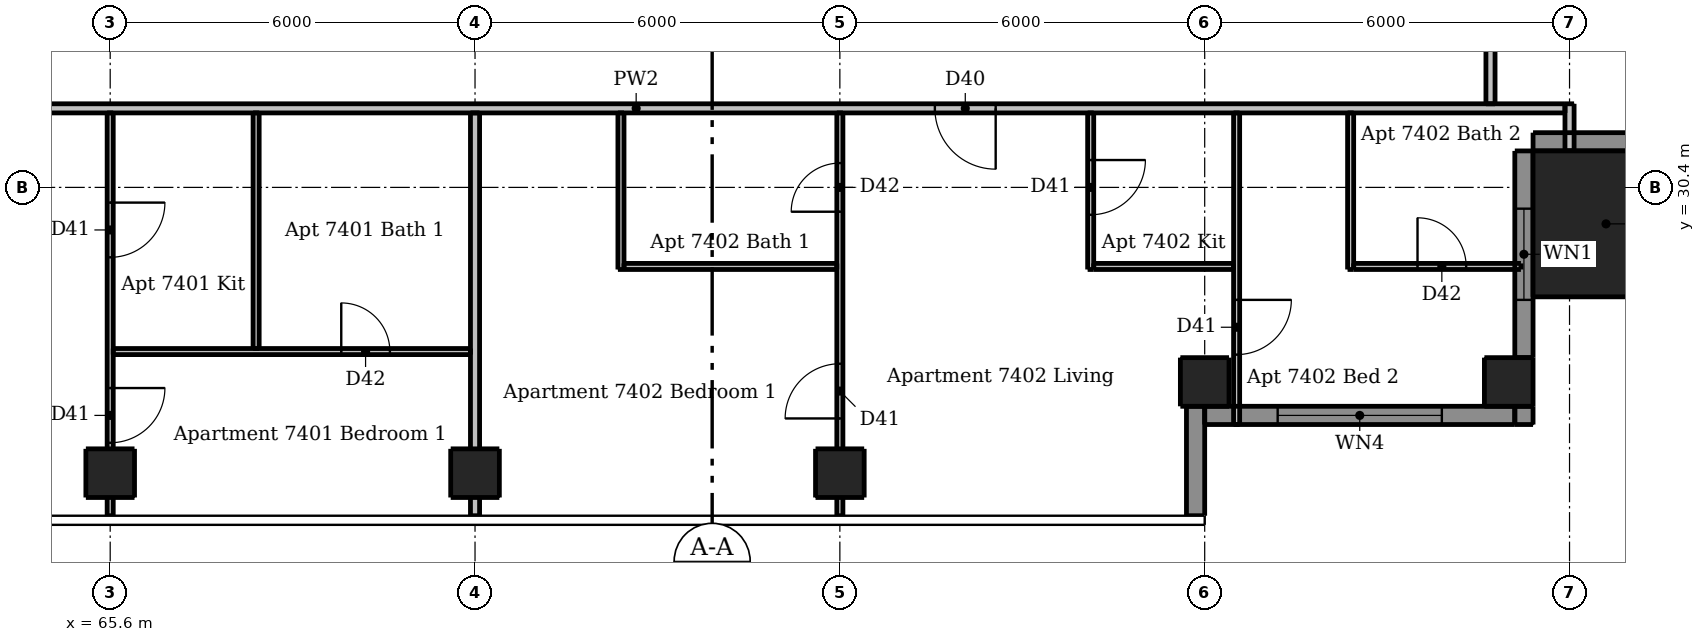
"""IFC4 building model, lengths in metres.
Left out: names, types, materials, properties, quantities, classifications, styles, units other than length and angle.
Written with IfcOpenShell. Run it as: python <this file> out.ifc"""

import sys

from ifc_helpers import new_model, si_unit, direction, frame, frame_2d, origin, origin_2d, place, context, subcontext, project, spatial, rectangle, extrude, element, fill, save


model = new_model("IFC4")
c1 = context("Model", 3, precision=1e-05, world=origin(), true_north=direction((0.0, 1.0)))
c2 = subcontext(c1, "Body", "Model", "MODEL_VIEW")
j1 = project(units=[si_unit("LENGTHUNIT", "METRE"), si_unit("PLANEANGLEUNIT", "RADIAN")], contexts=[c1])
p1 = place(None, origin())
s1 = spatial("IfcSite", under=j1, at=p1, CompositionType="ELEMENT")
p2 = place(p1, origin())
s2 = spatial("IfcBuilding", under=s1, at=p2, CompositionType="ELEMENT")
p3 = place(p2, frame((0.0, 0.0, 275.2)))
s3 = spatial("IfcBuildingStorey", under=s2, at=p3, CompositionType="ELEMENT", Elevation=275.2)
for number, where, z_axis, x_axis in (
    (1, (65.6, 25.7, 0.0), (0.0, 0.0, 1.0), (1.0, 0.0, 0.0)),
    (2, (71.6, 25.7, 0.0), (0.0, 0.0, 1.0), (1.0, 0.0, 0.0)),
    (3, (77.6, 25.7, 0.0), (0.0, 0.0, 1.0), (1.0, 0.0, 0.0)),
    (4, (83.6, 27.2, 0.0), (0.0, 0.0, 1.0), (1.0, 0.0, 0.0)),
    (5, (88.6, 27.2, 0.0), (0.0, 0.0, 1.0), (1.0, 0.0, 0.0)),
):
    element("IfcColumn", number, at=place(p3, frame(where, z_axis=z_axis, x_axis=x_axis)), inside=s3, PredefinedType="COLUMN", context=c2, shape_type="SweptSolid", body=[
        extrude(rectangle(XDim=0.8, YDim=0.8, at=origin_2d()), origin(), (0.0, 0.0, 1.0), 3.05),
    ])
p4 = place(p3, frame((90.2, 29.8, 0.0), z_axis=(0.0, 0.0, 1.0), x_axis=(1.0, 0.0, 0.0)))
e6 = element("IfcColumn", 6, at=p4, inside=s3, PredefinedType="COLUMN", context=c2, shape_type="SweptSolid", body=[
    extrude(rectangle(XDim=2.4, YDim=2.4, at=origin_2d()), origin(), (0.0, 0.0, 1.0), 3.3),
])
p5 = place(p3, frame((83.45, 25.0, 0.0), z_axis=(0.0, 0.0, 1.0), x_axis=(0.0, 1.0, 0.0)))
e7 = element("IfcWall", 7, at=p5, inside=s3, PredefinedType="SOLIDWALL", context=c2, shape_type="SweptSolid", body=[
    extrude(rectangle(XDim=1.8, YDim=0.3, at=frame_2d((0.9, 0.0))), origin(), (0.0, 0.0, 1.0), 3.05),
])
p6 = place(p3, frame((88.85, 26.5, 0.0), z_axis=(0.0, 0.0, 1.0), x_axis=(0.0, 1.0, 0.0)))
e8 = element("IfcWall", 8, at=p6, inside=s3, PredefinedType="SOLIDWALL", context=c2, shape_type="SweptSolid", body=[
    extrude(rectangle(XDim=0.3, YDim=0.3, at=frame_2d((0.15, 0.0))), origin(), (0.0, 0.0, 1.0), 3.05),
])
p7 = place(p3, frame((88.85, 27.6, 0.0), z_axis=(0.0, 0.0, 1.0), x_axis=(0.0, 1.0, 0.0)))
e9 = element("IfcWall", 9, at=p7, inside=s3, PredefinedType="SOLIDWALL", context=c2, shape_type="SweptSolid", body=[
    extrude(rectangle(XDim=3.4, YDim=0.3, at=frame_2d((1.7, 0.0))), origin(), (0.0, 0.0, 1.0), 3.05),
])
p8 = place(p7, frame((0.95, 0.0, 0.9)))
e10 = element("IfcOpeningElement", 10, at=p8, cuts=e9, PredefinedType="OPENING", context=c2, shape_type="SweptSolid", body=[
    extrude(rectangle(XDim=1.5, YDim=1.5, at=frame_2d((0.75, 0.75))), frame((0.0, 0.16, 0.0), z_axis=(0.0, -1.0, 0.0), x_axis=(1.0, 0.0, 0.0)), (0.0, 0.0, 1.0), 0.32),
])
p9 = place(p3, frame((89.0, 31.15, 0.0), z_axis=(0.0, 0.0, 1.0), x_axis=(1.0, 0.0, 0.0)))
e11 = element("IfcWall", 11, at=p9, inside=s3, PredefinedType="SOLIDWALL", context=c2, shape_type="SweptSolid", body=[
    extrude(rectangle(XDim=3.4, YDim=0.3, at=frame_2d((1.7, 0.0))), origin(), (0.0, 0.0, 1.0), 3.05),
])
p10 = place(p3, frame((83.6, 26.65, 0.0), z_axis=(0.0, 0.0, 1.0), x_axis=(1.0, 0.0, 0.0)))
e12 = element("IfcWall", 12, at=p10, inside=s3, PredefinedType="SOLIDWALL", context=c2, shape_type="SweptSolid", body=[
    extrude(rectangle(XDim=5.1, YDim=0.3, at=frame_2d((2.55, 0.0))), origin(), (0.0, 0.0, 1.0), 3.05),
])
p11 = place(p10, frame((1.2, 0.0, 0.15)))
e13 = element("IfcOpeningElement", 13, at=p11, cuts=e12, PredefinedType="OPENING", context=c2, shape_type="SweptSolid", body=[
    extrude(rectangle(XDim=2.7, YDim=2.1, at=frame_2d((1.35, 1.05))), frame((0.0, 0.16, 0.0), z_axis=(0.0, -1.0, 0.0), x_axis=(1.0, 0.0, 0.0)), (0.0, 0.0, 1.0), 0.32),
])
p12 = place(p3, frame((65.6, 31.625, 0.0), z_axis=(0.0, 0.0, 1.0), x_axis=(0.0, -1.0, 0.0)))
e14 = element("IfcWall", 14, at=p12, inside=s3, PredefinedType="PARTITIONING", context=c2, shape_type="SweptSolid", body=[
    extrude(rectangle(XDim=6.625, YDim=0.1, at=frame_2d((3.312, 0.0))), origin(), (0.0, 0.0, 1.0), 2.589),
])
p13 = place(p12, frame((1.475, 0.0, 0.0)))
e15 = element("IfcOpeningElement", 15, at=p13, cuts=e14, PredefinedType="OPENING", context=c2, shape_type="SweptSolid", body=[
    extrude(rectangle(XDim=0.9, YDim=2.1, at=frame_2d((0.45, 1.05))), frame((0.0, 0.06, 0.0), z_axis=(0.0, -1.0, 0.0), x_axis=(1.0, 0.0, 0.0)), (0.0, 0.0, 1.0), 0.12),
])
p14 = place(p12, frame((4.525, 0.0, 0.0)))
e16 = element("IfcOpeningElement", 16, at=p14, cuts=e14, PredefinedType="OPENING", context=c2, shape_type="SweptSolid", body=[
    extrude(rectangle(XDim=0.9, YDim=2.1, at=frame_2d((0.45, 1.05))), frame((0.0, 0.06, 0.0), z_axis=(0.0, -1.0, 0.0), x_axis=(1.0, 0.0, 0.0)), (0.0, 0.0, 1.0), 0.12),
])
p15 = place(p3, frame((68.0, 27.75, 0.0), z_axis=(0.0, 0.0, 1.0), x_axis=(0.0, 1.0, 0.0)))
e17 = element("IfcWall", 17, at=p15, inside=s3, PredefinedType="PARTITIONING", context=c2, shape_type="SweptSolid", body=[
    extrude(rectangle(XDim=3.875, YDim=0.1, at=frame_2d((1.938, 0.0))), origin(), (0.0, 0.0, 1.0), 3.05),
])
p16 = place(p3, frame((74.0, 29.05, 0.0), z_axis=(0.0, 0.0, 1.0), x_axis=(0.0, 1.0, 0.0)))
e18 = element("IfcWall", 18, at=p16, inside=s3, PredefinedType="PARTITIONING", context=c2, shape_type="SweptSolid", body=[
    extrude(rectangle(XDim=2.575, YDim=0.1, at=frame_2d((1.288, 0.0))), origin(), (0.0, 0.0, 1.0), 3.05),
])
p17 = place(p3, frame((77.6, 25.0, 0.0), z_axis=(0.0, 0.0, 1.0), x_axis=(0.0, 1.0, 0.0)))
e19 = element("IfcWall", 19, at=p17, inside=s3, PredefinedType="PARTITIONING", context=c2, shape_type="SweptSolid", body=[
    extrude(rectangle(XDim=6.625, YDim=0.1, at=frame_2d((3.312, 0.0))), origin(), (0.0, 0.0, 1.0), 2.589),
])
p18 = place(p17, frame((1.6, 0.0, 0.0)))
e20 = element("IfcOpeningElement", 20, at=p18, cuts=e19, PredefinedType="OPENING", context=c2, shape_type="SweptSolid", body=[
    extrude(rectangle(XDim=0.9, YDim=2.1, at=frame_2d((0.45, 1.05))), frame((0.0, 0.06, 0.0), z_axis=(0.0, -1.0, 0.0), x_axis=(1.0, 0.0, 0.0)), (0.0, 0.0, 1.0), 0.12),
])
p19 = place(p17, frame((5.0, 0.0, 0.0)))
e21 = element("IfcOpeningElement", 21, at=p19, cuts=e19, PredefinedType="OPENING", context=c2, shape_type="SweptSolid", body=[
    extrude(rectangle(XDim=0.8, YDim=2.1, at=frame_2d((0.4, 1.05))), frame((0.0, 0.06, 0.0), z_axis=(0.0, -1.0, 0.0), x_axis=(1.0, 0.0, 0.0)), (0.0, 0.0, 1.0), 0.12),
])
p20 = place(p3, frame((81.725, 31.625, 0.0), z_axis=(0.0, 0.0, 1.0), x_axis=(0.0, -1.0, 0.0)))
e22 = element("IfcWall", 22, at=p20, inside=s3, PredefinedType="PARTITIONING", context=c2, shape_type="SweptSolid", body=[
    extrude(rectangle(XDim=2.575, YDim=0.1, at=frame_2d((1.288, 0.0))), origin(), (0.0, 0.0, 1.0), 3.05),
])
p21 = place(p20, frame((0.775, 0.0, 0.0)))
e23 = element("IfcOpeningElement", 23, at=p21, cuts=e22, PredefinedType="OPENING", context=c2, shape_type="SweptSolid", body=[
    extrude(rectangle(XDim=0.9, YDim=2.1, at=frame_2d((0.45, 1.05))), frame((0.0, 0.06, 0.0), z_axis=(0.0, -1.0, 0.0), x_axis=(1.0, 0.0, 0.0)), (0.0, 0.0, 1.0), 0.12),
])
p22 = place(p3, frame((84.125, 31.625, 0.0), z_axis=(0.0, 0.0, 1.0), x_axis=(0.0, -1.0, 0.0)))
e24 = element("IfcWall", 24, at=p22, inside=s3, PredefinedType="PARTITIONING", context=c2, shape_type="SweptSolid", body=[
    extrude(rectangle(XDim=5.125, YDim=0.1, at=frame_2d((2.562, 0.0))), origin(), (0.0, 0.0, 1.0), 3.05),
])
p23 = place(p22, frame((3.075, 0.0, 0.0)))
e25 = element("IfcOpeningElement", 25, at=p23, cuts=e24, PredefinedType="OPENING", context=c2, shape_type="SweptSolid", body=[
    extrude(rectangle(XDim=0.9, YDim=2.1, at=frame_2d((0.45, 1.05))), frame((0.0, 0.06, 0.0), z_axis=(0.0, -1.0, 0.0), x_axis=(1.0, 0.0, 0.0)), (0.0, 0.0, 1.0), 0.12),
])
p24 = place(p3, frame((86.0, 29.05, 0.0), z_axis=(0.0, 0.0, 1.0), x_axis=(0.0, 1.0, 0.0)))
e26 = element("IfcWall", 26, at=p24, inside=s3, PredefinedType="PARTITIONING", context=c2, shape_type="SweptSolid", body=[
    extrude(rectangle(XDim=2.575, YDim=0.1, at=frame_2d((1.288, 0.0))), origin(), (0.0, 0.0, 1.0), 3.05),
])
p25 = place(p3, frame((74.05, 29.1, 0.0), z_axis=(0.0, 0.0, 1.0), x_axis=(1.0, 0.0, 0.0)))
e27 = element("IfcWall", 27, at=p25, inside=s3, PredefinedType="PARTITIONING", context=c2, shape_type="SweptSolid", body=[
    extrude(rectangle(XDim=3.5, YDim=0.1, at=frame_2d((1.75, 0.0))), origin(), (0.0, 0.0, 1.0), 3.05),
])
p26 = place(p3, frame((81.775, 29.1, 0.0), z_axis=(0.0, 0.0, 1.0), x_axis=(1.0, 0.0, 0.0)))
e28 = element("IfcWall", 28, at=p26, inside=s3, PredefinedType="PARTITIONING", context=c2, shape_type="SweptSolid", body=[
    extrude(rectangle(XDim=2.3, YDim=0.1, at=frame_2d((1.15, 0.0))), origin(), (0.0, 0.0, 1.0), 3.05),
])
p27 = place(p3, frame((86.05, 29.1, 0.0), z_axis=(0.0, 0.0, 1.0), x_axis=(1.0, 0.0, 0.0)))
e29 = element("IfcWall", 29, at=p27, inside=s3, PredefinedType="PARTITIONING", context=c2, shape_type="SweptSolid", body=[
    extrude(rectangle(XDim=2.75, YDim=0.1, at=frame_2d((1.375, 0.0))), origin(), (0.0, 0.0, 1.0), 3.05),
])
p28 = place(p27, frame((1.05, 0.0, 0.0)))
e30 = element("IfcOpeningElement", 30, at=p28, cuts=e29, PredefinedType="OPENING", context=c2, shape_type="SweptSolid", body=[
    extrude(rectangle(XDim=0.8, YDim=2.1, at=frame_2d((0.4, 1.05))), frame((0.0, 0.06, 0.0), z_axis=(0.0, -1.0, 0.0), x_axis=(1.0, 0.0, 0.0)), (0.0, 0.0, 1.0), 0.12),
])
p29 = place(p3, frame((65.65, 27.7, 0.0), z_axis=(0.0, 0.0, 1.0), x_axis=(1.0, 0.0, 0.0)))
e31 = element("IfcWall", 31, at=p29, inside=s3, PredefinedType="PARTITIONING", context=c2, shape_type="SweptSolid", body=[
    extrude(rectangle(XDim=5.875, YDim=0.1, at=frame_2d((2.938, 0.0))), origin(), (0.0, 0.0, 1.0), 3.05),
])
p30 = place(p29, frame((3.75, 0.0, 0.0)))
e32 = element("IfcOpeningElement", 32, at=p30, cuts=e31, PredefinedType="OPENING", context=c2, shape_type="SweptSolid", body=[
    extrude(rectangle(XDim=0.8, YDim=2.1, at=frame_2d((0.4, 1.05))), frame((0.0, 0.06, 0.0), z_axis=(0.0, -1.0, 0.0), x_axis=(1.0, 0.0, 0.0)), (0.0, 0.0, 1.0), 0.12),
])
p31 = place(p3, frame((71.6, 25.0, 0.0), z_axis=(0.0, 0.0, 1.0), x_axis=(0.0, 1.0, 0.0)))
e33 = element("IfcWall", 33, at=p31, inside=s3, PredefinedType="PARTITIONING", context=c2, shape_type="SweptSolid", body=[
    extrude(rectangle(XDim=6.625, YDim=0.15, at=frame_2d((3.312, 0.0))), origin(), (0.0, 0.0, 1.0), 2.589),
])
p32 = place(p3, frame((88.3, 61.175, 0.0), z_axis=(0.0, 0.0, 1.0), x_axis=(0.0, -1.0, 0.0)))
e34 = element("IfcWall", 34, at=p32, inside=s3, PredefinedType="PARTITIONING", context=c2, shape_type="SweptSolid", body=[
    extrude(rectangle(XDim=29.4, YDim=0.15, at=frame_2d((14.7, 0.0))), origin(), (0.0, 0.0, 1.0), 3.05),
])
p33 = place(p32, frame((27.175, 0.0, 0.0)))
e35 = element("IfcOpeningElement", 35, at=p33, cuts=e34, PredefinedType="OPENING", context=c2, shape_type="SweptSolid", body=[
    extrude(rectangle(XDim=1.0, YDim=2.1, at=frame_2d((0.5, 1.05))), frame((0.0, 0.085, 0.0), z_axis=(0.0, -1.0, 0.0), x_axis=(1.0, 0.0, 0.0)), (0.0, 0.0, 1.0), 0.17),
])
p34 = place(p32, frame((9.275, 0.0, 0.0)))
e36 = element("IfcOpeningElement", 36, at=p34, cuts=e34, PredefinedType="OPENING", context=c2, shape_type="SweptSolid", body=[
    extrude(rectangle(XDim=1.0, YDim=2.1, at=frame_2d((0.5, 1.05))), frame((0.0, 0.085, 0.0), z_axis=(0.0, -1.0, 0.0), x_axis=(1.0, 0.0, 0.0)), (0.0, 0.0, 1.0), 0.17),
])
p35 = place(p3, frame((89.6, 31.0, 0.0), z_axis=(0.0, 0.0, 1.0), x_axis=(0.0, 1.0, 0.0)))
e37 = element("IfcWall", 37, at=p35, inside=s3, PredefinedType="PARTITIONING", context=c2, shape_type="SweptSolid", body=[
    extrude(rectangle(XDim=0.775, YDim=0.15, at=frame_2d((0.387, 0.0))), origin(), (0.0, 0.0, 1.0), 3.05),
])
p36 = place(p3, frame((89.525, 31.7, 0.0), z_axis=(0.0, 0.0, 1.0), x_axis=(-1.0, 0.0, 0.0)))
e38 = element("IfcWall", 38, at=p36, inside=s3, PredefinedType="PARTITIONING", context=c2, shape_type="SweptSolid", body=[
    extrude(rectangle(XDim=30.55, YDim=0.15, at=frame_2d((15.275, 0.0))), origin(), (0.0, 0.0, 1.0), 3.05),
])
p37 = place(p36, frame((26.775, 0.0, 0.0)))
e39 = element("IfcOpeningElement", 39, at=p37, cuts=e38, PredefinedType="OPENING", context=c2, shape_type="SweptSolid", body=[
    extrude(rectangle(XDim=1.0, YDim=2.1, at=frame_2d((0.5, 1.05))), frame((0.0, 0.085, 0.0), z_axis=(0.0, -1.0, 0.0), x_axis=(1.0, 0.0, 0.0)), (0.0, 0.0, 1.0), 0.17),
])
p38 = place(p36, frame((9.363, 0.0, 0.0)))
e40 = element("IfcOpeningElement", 40, at=p38, cuts=e38, PredefinedType="OPENING", context=c2, shape_type="SweptSolid", body=[
    extrude(rectangle(XDim=1.0, YDim=2.1, at=frame_2d((0.5, 1.05))), frame((0.0, 0.085, 0.0), z_axis=(0.0, -1.0, 0.0), x_axis=(1.0, 0.0, 0.0)), (0.0, 0.0, 1.0), 0.17),
])
p39 = place(p8, origin())
e41 = element("IfcWindow", 41, at=p39, inside=s3, PartitioningType="DOUBLE_PANEL_VERTICAL", PredefinedType="WINDOW", context=c2, shape_type="SweptSolid", body=[
    extrude(rectangle(XDim=1.5, YDim=1.5, at=frame_2d((0.75, 0.75))), frame((0.0, 0.03, 0.0), z_axis=(0.0, -1.0, 0.0), x_axis=(1.0, 0.0, 0.0)), (0.0, 0.0, 1.0), 0.06),
])
fill(e10, e41)
p40 = place(p11, origin())
e42 = element("IfcWindow", 42, at=p40, inside=s3, PartitioningType="DOUBLE_PANEL_VERTICAL", PredefinedType="WINDOW", context=c2, shape_type="SweptSolid", body=[
    extrude(rectangle(XDim=2.7, YDim=2.1, at=frame_2d((1.35, 1.05))), frame((0.0, 0.03, 0.0), z_axis=(0.0, -1.0, 0.0), x_axis=(1.0, 0.0, 0.0)), (0.0, 0.0, 1.0), 0.06),
])
fill(e13, e42)
p41 = place(p13, origin())
e43 = element("IfcDoor", 43, at=p41, inside=s3, OperationType="SINGLE_SWING_LEFT", PredefinedType="DOOR", context=c2, shape_type="SweptSolid", body=[
    extrude(rectangle(XDim=0.9, YDim=2.1, at=frame_2d((0.45, 1.05))), frame((0.0, 0.025, 0.0), z_axis=(0.0, -1.0, 0.0), x_axis=(1.0, 0.0, 0.0)), (0.0, 0.0, 1.0), 0.05),
])
fill(e15, e43)
p42 = place(p14, origin())
e44 = element("IfcDoor", 44, at=p42, inside=s3, OperationType="SINGLE_SWING_LEFT", PredefinedType="DOOR", context=c2, shape_type="SweptSolid", body=[
    extrude(rectangle(XDim=0.9, YDim=2.1, at=frame_2d((0.45, 1.05))), frame((0.0, 0.025, 0.0), z_axis=(0.0, -1.0, 0.0), x_axis=(1.0, 0.0, 0.0)), (0.0, 0.0, 1.0), 0.05),
])
fill(e16, e44)
p43 = place(p30, origin())
e45 = element("IfcDoor", 45, at=p43, inside=s3, OperationType="SINGLE_SWING_LEFT", PredefinedType="DOOR", context=c2, shape_type="SweptSolid", body=[
    extrude(rectangle(XDim=0.8, YDim=2.1, at=frame_2d((0.4, 1.05))), frame((0.0, 0.025, 0.0), z_axis=(0.0, -1.0, 0.0), x_axis=(1.0, 0.0, 0.0)), (0.0, 0.0, 1.0), 0.05),
])
fill(e32, e45)
p44 = place(p38, origin())
e46 = element("IfcDoor", 46, at=p44, inside=s3, OperationType="SINGLE_SWING_LEFT", PredefinedType="DOOR", context=c2, shape_type="SweptSolid", body=[
    extrude(rectangle(XDim=1.0, YDim=2.1, at=frame_2d((0.5, 1.05))), frame((0.0, 0.025, 0.0), z_axis=(0.0, -1.0, 0.0), x_axis=(1.0, 0.0, 0.0)), (0.0, 0.0, 1.0), 0.05),
])
fill(e40, e46)
p45 = place(p21, origin())
e47 = element("IfcDoor", 47, at=p45, inside=s3, OperationType="SINGLE_SWING_LEFT", PredefinedType="DOOR", context=c2, shape_type="SweptSolid", body=[
    extrude(rectangle(XDim=0.9, YDim=2.1, at=frame_2d((0.45, 1.05))), frame((0.0, 0.025, 0.0), z_axis=(0.0, -1.0, 0.0), x_axis=(1.0, 0.0, 0.0)), (0.0, 0.0, 1.0), 0.05),
])
fill(e23, e47)
p46 = place(p18, origin())
e48 = element("IfcDoor", 48, at=p46, inside=s3, OperationType="SINGLE_SWING_LEFT", PredefinedType="DOOR", context=c2, shape_type="SweptSolid", body=[
    extrude(rectangle(XDim=0.9, YDim=2.1, at=frame_2d((0.45, 1.05))), frame((0.0, 0.025, 0.0), z_axis=(0.0, -1.0, 0.0), x_axis=(1.0, 0.0, 0.0)), (0.0, 0.0, 1.0), 0.05),
])
fill(e20, e48)
p47 = place(p19, origin())
e49 = element("IfcDoor", 49, at=p47, inside=s3, OperationType="SINGLE_SWING_LEFT", PredefinedType="DOOR", context=c2, shape_type="SweptSolid", body=[
    extrude(rectangle(XDim=0.8, YDim=2.1, at=frame_2d((0.4, 1.05))), frame((0.0, 0.025, 0.0), z_axis=(0.0, -1.0, 0.0), x_axis=(1.0, 0.0, 0.0)), (0.0, 0.0, 1.0), 0.05),
])
fill(e21, e49)
p48 = place(p23, origin())
e50 = element("IfcDoor", 50, at=p48, inside=s3, OperationType="SINGLE_SWING_LEFT", PredefinedType="DOOR", context=c2, shape_type="SweptSolid", body=[
    extrude(rectangle(XDim=0.9, YDim=2.1, at=frame_2d((0.45, 1.05))), frame((0.0, 0.025, 0.0), z_axis=(0.0, -1.0, 0.0), x_axis=(1.0, 0.0, 0.0)), (0.0, 0.0, 1.0), 0.05),
])
fill(e25, e50)
p49 = place(p28, origin())
e51 = element("IfcDoor", 51, at=p49, inside=s3, OperationType="SINGLE_SWING_LEFT", PredefinedType="DOOR", context=c2, shape_type="SweptSolid", body=[
    extrude(rectangle(XDim=0.8, YDim=2.1, at=frame_2d((0.4, 1.05))), frame((0.0, 0.025, 0.0), z_axis=(0.0, -1.0, 0.0), x_axis=(1.0, 0.0, 0.0)), (0.0, 0.0, 1.0), 0.05),
])
fill(e30, e51)
save(model, sys.argv[1])
